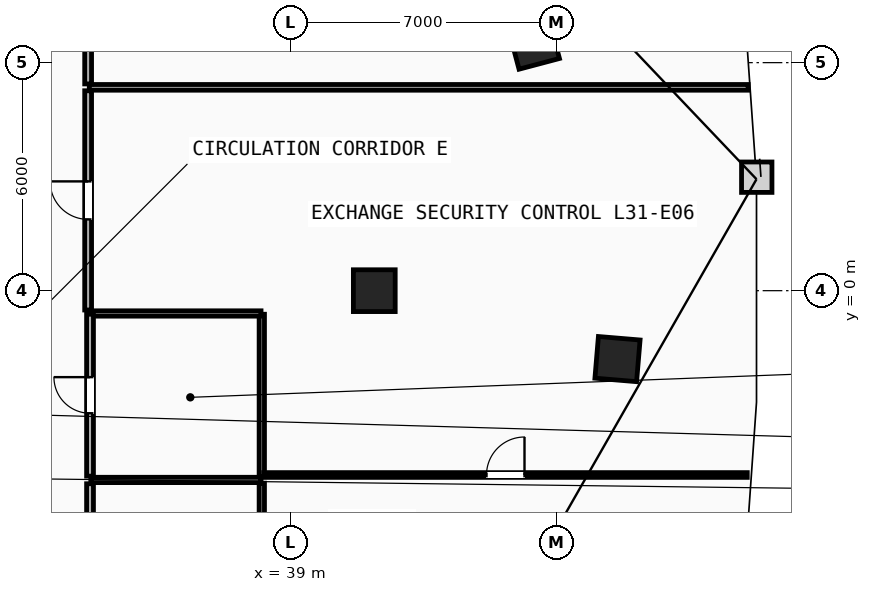
"""IFC4 building model, lengths in metres.
Left out: names, types, materials, properties, quantities, classifications, styles, units other than length and angle.
Written with IfcOpenShell. Run it as: python <this file> out.ifc"""

import sys

from ifc_helpers import new_model, si_unit, direction, frame, frame_2d, origin, origin_2d, place, context, subcontext, project, spatial, rectangle, extrude, element, fill, save


model = new_model("IFC4")
c1 = context("Model", 3, precision=1e-05, world=origin(), true_north=direction((0.0, 1.0)))
c2 = subcontext(c1, "Body", "Model", "MODEL_VIEW")
j1 = project(units=[si_unit("LENGTHUNIT", "METRE"), si_unit("PLANEANGLEUNIT", "RADIAN")], contexts=[c1])
p1 = place(None, origin())
s1 = spatial("IfcSite", under=j1, at=p1, CompositionType="ELEMENT")
p2 = place(p1, origin())
s2 = spatial("IfcBuilding", under=s1, at=p2, CompositionType="ELEMENT")
p3 = place(p2, frame((0.0, 0.0, 121.4)))
s3 = spatial("IfcBuildingStorey", under=s2, at=p3, CompositionType="ELEMENT", Elevation=121.4)
for number, where, z_axis, x_axis in (
    (1, (41.2, 0.0, 0.0), (0.0, 0.0, 1.0), (1.0, 0.0, 0.0)),
    (2, (47.6, -1.8, 0.0), (0.0, 0.0, 1.0), (0.084, 0.997, 0.0)),
    (3, (45.4, 6.5, 0.0), (0.0, 0.0, 1.0), (-0.256, 0.967, 0.0)),
):
    element("IfcColumn", number, at=place(p3, frame(where, z_axis=z_axis, x_axis=x_axis)), inside=s3, PredefinedType="COLUMN", context=c2, shape_type="SweptSolid", body=[
        extrude(rectangle(XDim=1.1, YDim=1.1, at=origin_2d()), origin(), (0.0, 0.0, 1.0), 3.6),
    ])
p4 = place(p3, frame((38.24, -8.415, 0.0), z_axis=(0.0, 0.0, 1.0), x_axis=(0.0, 1.0, 0.0)))
e4 = element("IfcWall", 4, at=p4, inside=s3, PredefinedType="PARTITIONING", context=c2, shape_type="SweptSolid", body=[
    extrude(rectangle(XDim=3.35, YDim=0.14, at=frame_2d((1.675, 0.0))), origin(), (0.0, 0.0, 1.0), 3.3),
])
p5 = place(p3, frame((38.24, -4.895, 0.0), z_axis=(0.0, 0.0, 1.0), x_axis=(0.0, 1.0, 0.0)))
e5 = element("IfcWall", 5, at=p5, inside=s3, PredefinedType="PARTITIONING", context=c2, shape_type="SweptSolid", body=[
    extrude(rectangle(XDim=4.275, YDim=0.14, at=frame_2d((2.137, 0.0))), origin(), (0.0, 0.0, 1.0), 3.3),
])
for number, where, z_axis, x_axis in (
    (6, (33.74, -0.6, 0.0), (0.0, 0.0, 1.0), (1.0, 0.0, 0.0)),
    (7, (33.74, -4.98, 0.0), (0.0, 0.0, 1.0), (1.0, 0.0, 0.0)),
):
    element("IfcWall", number, at=place(p3, frame(where, z_axis=z_axis, x_axis=x_axis)), inside=s3, PredefinedType="PARTITIONING", context=c2, shape_type="SweptSolid", body=[
        extrude(rectangle(XDim=4.48, YDim=0.14, at=frame_2d((2.24, 0.0))), origin(), (0.0, 0.0, 1.0), 3.3),
    ])
p6 = place(p3, frame((33.72, -4.88, 0.0), z_axis=(0.0, 0.0, 1.0), x_axis=(0.0, 1.0, 0.0)))
e8 = element("IfcWall", 8, at=p6, inside=s3, PredefinedType="PARTITIONING", context=c2, shape_type="SweptSolid", body=[
    extrude(rectangle(XDim=4.26, YDim=0.18, at=frame_2d((2.13, 0.0))), origin(), (0.0, 0.0, 1.0), 3.3),
])
p7 = place(p6, frame((1.655, 0.0, 0.0)))
e9 = element("IfcOpeningElement", 9, at=p7, cuts=e8, PredefinedType="OPENING", context=c2, shape_type="SweptSolid", body=[
    extrude(rectangle(XDim=0.95, YDim=2.1, at=frame_2d((0.475, 1.05))), frame((0.0, 0.1, 0.0), z_axis=(0.0, -1.0, 0.0), x_axis=(1.0, 0.0, 0.0)), (0.0, 0.0, 1.0), 0.2),
])
p8 = place(p3, frame((33.72, -9.24, 0.0), z_axis=(0.0, 0.0, 1.0), x_axis=(0.0, 1.0, 0.0)))
e10 = element("IfcWall", 10, at=p8, inside=s3, PredefinedType="PARTITIONING", context=c2, shape_type="SweptSolid", body=[
    extrude(rectangle(XDim=4.16, YDim=0.18, at=frame_2d((2.08, 0.0))), origin(), (0.0, 0.0, 1.0), 3.3),
])
p9 = place(p8, frame((1.58, 0.0, 0.0)))
e11 = element("IfcOpeningElement", 11, at=p9, cuts=e10, PredefinedType="OPENING", context=c2, shape_type="SweptSolid", body=[
    extrude(rectangle(XDim=1.0, YDim=2.15, at=frame_2d((0.5, 1.075))), frame((0.0, 0.1, 0.0), z_axis=(0.0, -1.0, 0.0), x_axis=(1.0, 0.0, 0.0)), (0.0, 0.0, 1.0), 0.2),
])
p10 = place(p3, frame((33.7, 5.35, 0.0), z_axis=(0.0, 0.0, 1.0), x_axis=(1.0, 0.0, 0.0)))
e12 = element("IfcWall", 12, at=p10, inside=s3, PredefinedType="PARTITIONING", context=c2, shape_type="SweptSolid", body=[
    extrude(rectangle(XDim=17.338, YDim=0.15, at=frame_2d((8.669, 0.0))), origin(), (0.0, 0.0, 1.0), 3.3),
])
p11 = place(p3, frame((33.67, -0.509, 0.0), z_axis=(0.0, 0.0, 1.0), x_axis=(0.0, 1.0, 0.0)))
e13 = element("IfcWall", 13, at=p11, inside=s3, PredefinedType="PARTITIONING", context=c2, shape_type="SweptSolid", body=[
    extrude(rectangle(XDim=5.769, YDim=0.18, at=frame_2d((2.884, 0.0))), origin(), (0.0, 0.0, 1.0), 3.3),
])
p12 = place(p11, frame((2.384, 0.0, 0.0)))
e14 = element("IfcOpeningElement", 14, at=p12, cuts=e13, PredefinedType="OPENING", context=c2, shape_type="SweptSolid", body=[
    extrude(rectangle(XDim=1.0, YDim=2.15, at=frame_2d((0.5, 1.075))), frame((0.0, 0.1, 0.0), z_axis=(0.0, -1.0, 0.0), x_axis=(1.0, 0.0, 0.0)), (0.0, 0.0, 1.0), 0.2),
])
p13 = place(p3, frame((33.67, 5.44, 0.0), z_axis=(0.0, 0.0, 1.0), x_axis=(0.0, 1.0, 0.0)))
e15 = element("IfcWall", 15, at=p13, inside=s3, PredefinedType="PARTITIONING", context=c2, shape_type="SweptSolid", body=[
    extrude(rectangle(XDim=5.96, YDim=0.18, at=frame_2d((2.98, 0.0))), origin(), (0.0, 0.0, 1.0), 3.3),
])
p14 = place(p3, frame((38.292, -4.85, 0.0), z_axis=(0.0, 0.0, 1.0), x_axis=(1.0, 0.0, 0.0)))
e16 = element("IfcWall", 16, at=p14, inside=s3, PredefinedType="PARTITIONING", context=c2, shape_type="SweptSolid", body=[
    extrude(rectangle(XDim=12.723, YDim=0.125, at=frame_2d((6.361, 0.0))), origin(), (0.0, 0.0, 1.0), 3.3),
])
p15 = place(p14, frame((5.861, 0.0, 0.0)))
e17 = element("IfcOpeningElement", 17, at=p15, cuts=e16, PredefinedType="OPENING", context=c2, shape_type="SweptSolid", body=[
    extrude(rectangle(XDim=1.0, YDim=2.15, at=frame_2d((0.5, 1.075))), frame((0.0, 0.073, 0.0), z_axis=(0.0, -1.0, 0.0), x_axis=(1.0, 0.0, 0.0)), (0.0, 0.0, 1.0), 0.145),
])
p16 = place(p15, origin())
e18 = element("IfcDoor", 18, at=p16, inside=s3, OperationType="SINGLE_SWING_RIGHT", PredefinedType="DOOR", context=c2, shape_type="SweptSolid", body=[
    extrude(rectangle(XDim=1.0, YDim=2.15, at=frame_2d((0.5, 1.075))), frame((0.0, 0.025, 0.0), z_axis=(0.0, -1.0, 0.0), x_axis=(1.0, 0.0, 0.0)), (0.0, 0.0, 1.0), 0.05),
])
fill(e17, e18)
p17 = place(p12, origin())
e19 = element("IfcDoor", 19, at=p17, inside=s3, OperationType="SINGLE_SWING_RIGHT", PredefinedType="DOOR", context=c2, shape_type="SweptSolid", body=[
    extrude(rectangle(XDim=1.0, YDim=2.15, at=frame_2d((0.5, 1.075))), frame((0.0, 0.025, 0.0), z_axis=(0.0, -1.0, 0.0), x_axis=(1.0, 0.0, 0.0)), (0.0, 0.0, 1.0), 0.05),
])
fill(e14, e19)
p18 = place(p7, origin())
e20 = element("IfcDoor", 20, at=p18, inside=s3, OperationType="SINGLE_SWING_RIGHT", PredefinedType="DOOR", context=c2, shape_type="SweptSolid", body=[
    extrude(rectangle(XDim=0.95, YDim=2.1, at=frame_2d((0.475, 1.05))), frame((0.0, 0.025, 0.0), z_axis=(0.0, -1.0, 0.0), x_axis=(1.0, 0.0, 0.0)), (0.0, 0.0, 1.0), 0.05),
])
fill(e9, e20)
save(model, sys.argv[1])
